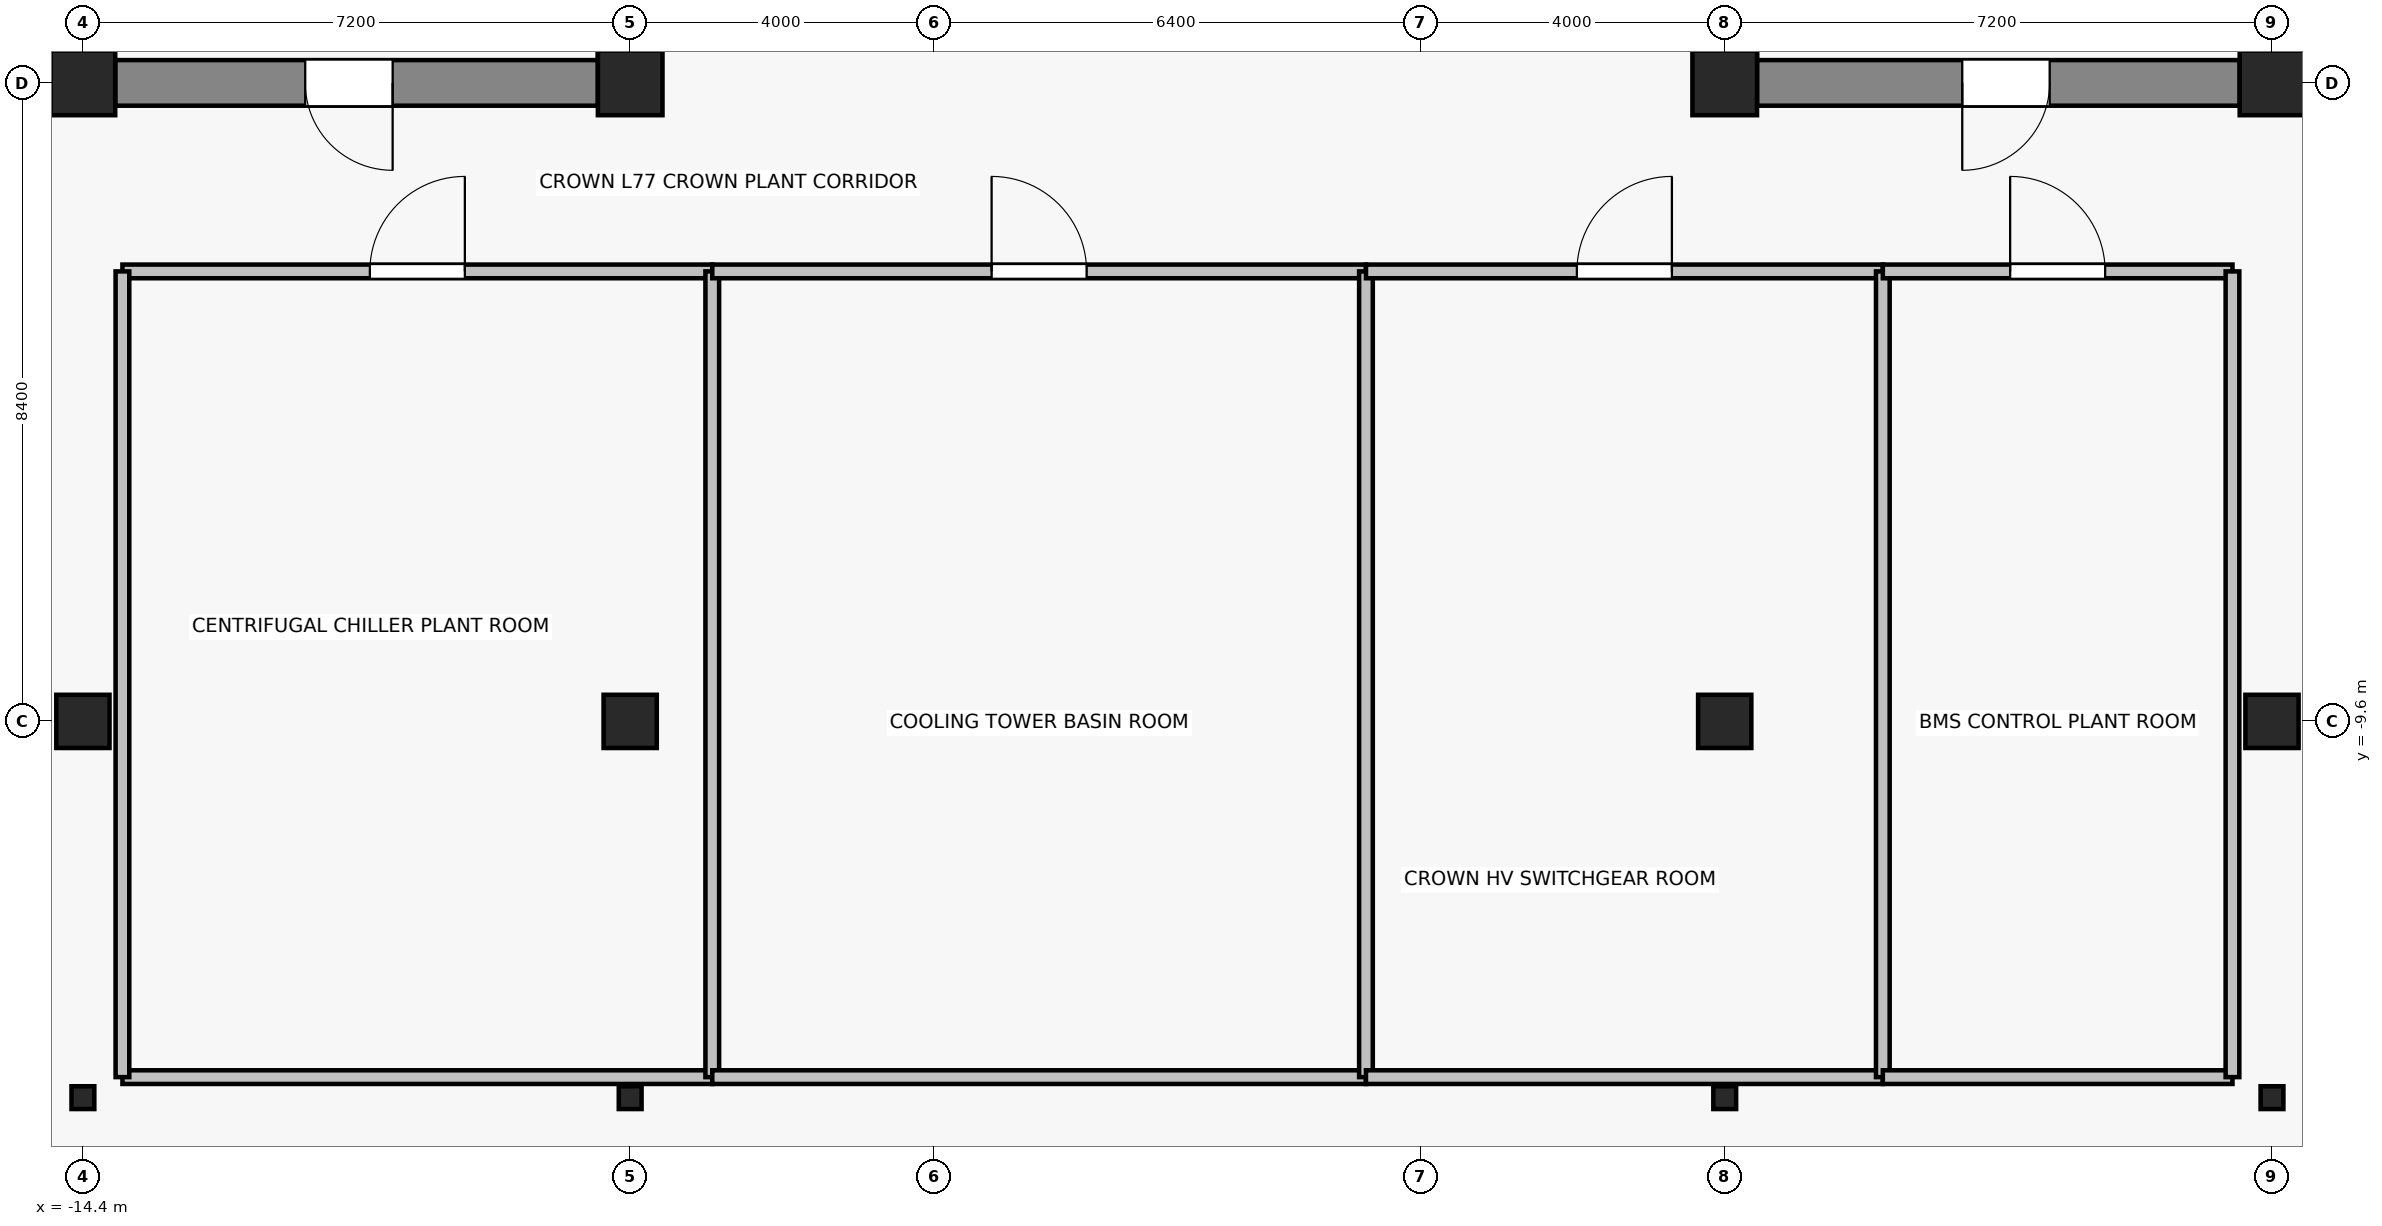
"""IFC4 building model, lengths in metres.
Left out: names, types, materials, properties, quantities, classifications, styles, units other than length and angle.
Written with IfcOpenShell. Run it as: python <this file> out.ifc"""

import sys

from ifc_helpers import new_model, si_unit, direction, frame, frame_2d, origin, origin_2d, place, context, subcontext, project, spatial, rectangle, i_section, extrude, source, transform, mapped, element, fill, save


model = new_model("IFC4")
c1 = context("Model", 3, precision=1e-05, world=origin(), true_north=direction((0.0, 1.0)))
c2 = subcontext(c1, "Body", "Model", "MODEL_VIEW")
j1 = project(units=[si_unit("LENGTHUNIT", "METRE"), si_unit("PLANEANGLEUNIT", "RADIAN")], contexts=[c1])
p1 = place(None, origin())
s1 = spatial("IfcSite", under=j1, at=p1, CompositionType="ELEMENT")
p2 = place(p1, origin())
s2 = spatial("IfcBuilding", under=s1, at=p2, CompositionType="ELEMENT")
p3 = place(p2, frame((0.0, 0.0, 271.6)))
s3 = spatial("IfcBuildingStorey", under=s2, at=p3, CompositionType="ELEMENT", Elevation=271.6)
for number, where, z_axis, x_axis in (
    (1, (-14.4, -1.2, 0.0), (0.0, 0.0, 1.0), (1.0, 0.0, 0.0)),
    (2, (-7.2, -1.2, 0.0), (0.0, 0.0, 1.0), (1.0, 0.0, 0.0)),
    (3, (7.2, -1.2, 0.0), (0.0, 0.0, 1.0), (1.0, 0.0, 0.0)),
    (4, (14.4, -1.2, 0.0), (0.0, 0.0, 1.0), (1.0, 0.0, 0.0)),
):
    element("IfcColumn", number, at=place(p3, frame(where, z_axis=z_axis, x_axis=x_axis)), inside=s3, PredefinedType="COLUMN", context=c2, shape_type="SweptSolid", body=[
        extrude(rectangle(XDim=0.85, YDim=0.85, at=origin_2d()), origin(), (0.0, 0.0, 1.0), 4.6),
    ])
p4 = place(p3, frame((-14.4, -9.6, 0.0), z_axis=(0.0, 0.0, 1.0), x_axis=(1.0, 0.0, 0.0)))
e5 = element("IfcColumn", 5, at=p4, inside=s3, PredefinedType="COLUMN", context=c2, shape_type="SweptSolid", body=[
    extrude(rectangle(XDim=0.7, YDim=0.7, at=origin_2d()), origin(), (0.0, 0.0, 1.0), 4.6),
])
p5 = place(p3, frame((-14.4, -14.55, 0.0), z_axis=(0.0, 0.0, 1.0), x_axis=(1.0, 0.0, 0.0)))
e6 = element("IfcColumn", 6, at=p5, inside=s3, PredefinedType="COLUMN", context=c2, shape_type="SweptSolid", body=[
    extrude(i_section(OverallWidth=0.3, OverallDepth=0.3, WebThickness=0.011, FlangeThickness=0.019, FilletRadius=0.027, at=origin_2d()), origin(), (0.0, 0.0, 1.0), 4.6),
])
p6 = place(p3, frame((-7.2, -9.6, 0.0), z_axis=(0.0, 0.0, 1.0), x_axis=(1.0, 0.0, 0.0)))
e7 = element("IfcColumn", 7, at=p6, inside=s3, PredefinedType="COLUMN", context=c2, shape_type="SweptSolid", body=[
    extrude(rectangle(XDim=0.7, YDim=0.7, at=origin_2d()), origin(), (0.0, 0.0, 1.0), 4.6),
])
p7 = place(p3, frame((-7.2, -14.55, 0.0), z_axis=(0.0, 0.0, 1.0), x_axis=(1.0, 0.0, 0.0)))
e8 = element("IfcColumn", 8, at=p7, inside=s3, PredefinedType="COLUMN", context=c2, shape_type="SweptSolid", body=[
    extrude(i_section(OverallWidth=0.3, OverallDepth=0.3, WebThickness=0.011, FlangeThickness=0.019, FilletRadius=0.027, at=origin_2d()), origin(), (0.0, 0.0, 1.0), 4.6),
])
p8 = place(p3, frame((7.2, -9.6, 0.0), z_axis=(0.0, 0.0, 1.0), x_axis=(1.0, 0.0, 0.0)))
e9 = element("IfcColumn", 9, at=p8, inside=s3, PredefinedType="COLUMN", context=c2, shape_type="SweptSolid", body=[
    extrude(rectangle(XDim=0.7, YDim=0.7, at=origin_2d()), origin(), (0.0, 0.0, 1.0), 4.6),
])
p9 = place(p3, frame((7.2, -14.55, 0.0), z_axis=(0.0, 0.0, 1.0), x_axis=(1.0, 0.0, 0.0)))
e10 = element("IfcColumn", 10, at=p9, inside=s3, PredefinedType="COLUMN", context=c2, shape_type="SweptSolid", body=[
    extrude(i_section(OverallWidth=0.3, OverallDepth=0.3, WebThickness=0.011, FlangeThickness=0.019, FilletRadius=0.027, at=origin_2d()), origin(), (0.0, 0.0, 1.0), 4.6),
])
p10 = place(p3, frame((14.4, -9.6, 0.0), z_axis=(0.0, 0.0, 1.0), x_axis=(1.0, 0.0, 0.0)))
e11 = element("IfcColumn", 11, at=p10, inside=s3, PredefinedType="COLUMN", context=c2, shape_type="SweptSolid", body=[
    extrude(rectangle(XDim=0.7, YDim=0.7, at=origin_2d()), origin(), (0.0, 0.0, 1.0), 4.6),
])
p11 = place(p3, frame((14.4, -14.55, 0.0), z_axis=(0.0, 0.0, 1.0), x_axis=(1.0, 0.0, 0.0)))
e12 = element("IfcColumn", 12, at=p11, inside=s3, PredefinedType="COLUMN", context=c2, shape_type="SweptSolid", body=[
    extrude(i_section(OverallWidth=0.3, OverallDepth=0.3, WebThickness=0.011, FlangeThickness=0.019, FilletRadius=0.027, at=origin_2d()), origin(), (0.0, 0.0, 1.0), 4.6),
])
p12 = place(p3, frame((-7.625, -1.2, 0.0), z_axis=(0.0, 0.0, 1.0), x_axis=(-1.0, 0.0, 0.0)))
e13 = element("IfcWall", 13, at=p12, inside=s3, PredefinedType="SHEAR", context=c2, shape_type="SweptSolid", body=[
    extrude(rectangle(XDim=6.35, YDim=0.6, at=frame_2d((3.175, 0.0))), origin(), (0.0, 0.0, 1.0), 4.38),
])
p13 = place(p12, frame((2.7, 0.0, 0.0)))
e14 = element("IfcOpeningElement", 14, at=p13, cuts=e13, PredefinedType="OPENING", context=c2, shape_type="SweptSolid", body=[
    extrude(rectangle(XDim=1.15, YDim=2.15, at=frame_2d((0.575, 1.075))), frame((0.0, 0.31, 0.0), z_axis=(0.0, -1.0, 0.0), x_axis=(1.0, 0.0, 0.0)), (0.0, 0.0, 1.0), 0.62),
])
p14 = place(p3, frame((13.975, -1.2, 0.0), z_axis=(0.0, 0.0, 1.0), x_axis=(-1.0, 0.0, 0.0)))
e15 = element("IfcWall", 15, at=p14, inside=s3, PredefinedType="SHEAR", context=c2, shape_type="SweptSolid", body=[
    extrude(rectangle(XDim=6.35, YDim=0.6, at=frame_2d((3.175, 0.0))), origin(), (0.0, 0.0, 1.0), 4.38),
])
p15 = place(p14, frame((2.5, 0.0, 0.0)))
e16 = element("IfcOpeningElement", 16, at=p15, cuts=e15, PredefinedType="OPENING", context=c2, shape_type="SweptSolid", body=[
    extrude(rectangle(XDim=1.15, YDim=2.15, at=frame_2d((0.575, 1.075))), frame((0.0, 0.31, 0.0), z_axis=(0.0, -1.0, 0.0), x_axis=(1.0, 0.0, 0.0)), (0.0, 0.0, 1.0), 0.62),
])
for number, where, z_axis, x_axis in (
    (17, (-7.4, -0.9, 0.0), (0.0, 0.0, 1.0), (0.0, 1.0, 0.0)),
    (18, (7.4, -0.9, 0.0), (0.0, 0.0, 1.0), (0.0, 1.0, 0.0)),
):
    element("IfcWall", number, at=place(p3, frame(where, z_axis=z_axis, x_axis=x_axis)), inside=s3, PredefinedType="SHEAR", context=c2, shape_type="SweptSolid", body=[
        extrude(rectangle(XDim=4.15, YDim=0.45, at=frame_2d((2.075, 0.0))), origin(), (0.0, 0.0, 1.0), 4.38),
    ])
p16 = place(p3, frame((-6.12, -14.28, 0.0), z_axis=(0.0, 0.0, 1.0), x_axis=(-1.0, 0.0, 0.0)))
e19 = element("IfcWall", 19, at=p16, inside=s3, PredefinedType="PARTITIONING", context=c2, shape_type="SweptSolid", body=[
    extrude(rectangle(XDim=7.76, YDim=0.18, at=frame_2d((3.88, 0.0))), origin(), (0.0, 0.0, 1.0), 3.77),
])
p17 = place(p3, frame((-13.88, -3.68, 0.0), z_axis=(0.0, 0.0, 1.0), x_axis=(1.0, 0.0, 0.0)))
e20 = element("IfcWall", 20, at=p17, inside=s3, PredefinedType="PARTITIONING", context=c2, shape_type="SweptSolid", body=[
    extrude(rectangle(XDim=7.76, YDim=0.18, at=frame_2d((3.88, 0.0))), origin(), (0.0, 0.0, 1.0), 3.77),
])
p18 = place(p17, frame((3.255, 0.0, 0.0)))
e21 = element("IfcOpeningElement", 21, at=p18, cuts=e20, PredefinedType="OPENING", context=c2, shape_type="SweptSolid", body=[
    extrude(rectangle(XDim=1.25, YDim=2.15, at=frame_2d((0.625, 1.075))), frame((0.0, 0.1, 0.0), z_axis=(0.0, -1.0, 0.0), x_axis=(1.0, 0.0, 0.0)), (0.0, 0.0, 1.0), 0.2),
])
for number, where, z_axis, x_axis in (
    (22, (-13.88, -14.28, 0.0), (0.0, 0.0, 1.0), (0.0, 1.0, 0.0)),
    (23, (-6.12, -3.68, 0.0), (0.0, 0.0, 1.0), (0.0, -1.0, 0.0)),
):
    element("IfcWall", number, at=place(p3, frame(where, z_axis=z_axis, x_axis=x_axis)), inside=s3, PredefinedType="PARTITIONING", context=c2, shape_type="SweptSolid", body=[
        extrude(rectangle(XDim=10.6, YDim=0.18, at=frame_2d((5.3, 0.0))), origin(), (0.0, 0.0, 1.0), 3.77),
    ])
p19 = place(p3, frame((2.48, -14.28, 0.0), z_axis=(0.0, 0.0, 1.0), x_axis=(-1.0, 0.0, 0.0)))
e24 = element("IfcWall", 24, at=p19, inside=s3, PredefinedType="PARTITIONING", context=c2, shape_type="SweptSolid", body=[
    extrude(rectangle(XDim=8.6, YDim=0.18, at=frame_2d((4.3, 0.0))), origin(), (0.0, 0.0, 1.0), 4.09),
])
p20 = place(p3, frame((-6.12, -3.68, 0.0), z_axis=(0.0, 0.0, 1.0), x_axis=(1.0, 0.0, 0.0)))
e25 = element("IfcWall", 25, at=p20, inside=s3, PredefinedType="PARTITIONING", context=c2, shape_type="SweptSolid", body=[
    extrude(rectangle(XDim=8.6, YDim=0.18, at=frame_2d((4.3, 0.0))), origin(), (0.0, 0.0, 1.0), 4.38),
])
p21 = place(p20, frame((3.675, 0.0, 0.0)))
e26 = element("IfcOpeningElement", 26, at=p21, cuts=e25, PredefinedType="OPENING", context=c2, shape_type="SweptSolid", body=[
    extrude(rectangle(XDim=1.25, YDim=2.15, at=frame_2d((0.625, 1.075))), frame((0.0, 0.1, 0.0), z_axis=(0.0, -1.0, 0.0), x_axis=(1.0, 0.0, 0.0)), (0.0, 0.0, 1.0), 0.2),
])
p22 = place(p3, frame((2.48, -3.68, 0.0), z_axis=(0.0, 0.0, 1.0), x_axis=(0.0, -1.0, 0.0)))
e27 = element("IfcWall", 27, at=p22, inside=s3, PredefinedType="PARTITIONING", context=c2, shape_type="SweptSolid", body=[
    extrude(rectangle(XDim=10.6, YDim=0.18, at=frame_2d((5.3, 0.0))), origin(), (0.0, 0.0, 1.0), 3.77),
])
p23 = place(p3, frame((9.28, -14.28, 0.0), z_axis=(0.0, 0.0, 1.0), x_axis=(-1.0, 0.0, 0.0)))
e28 = element("IfcWall", 28, at=p23, inside=s3, PredefinedType="PARTITIONING", context=c2, shape_type="SweptSolid", body=[
    extrude(rectangle(XDim=6.8, YDim=0.18, at=frame_2d((3.4, 0.0))), origin(), (0.0, 0.0, 1.0), 3.77),
])
p24 = place(p3, frame((2.48, -3.68, 0.0), z_axis=(0.0, 0.0, 1.0), x_axis=(1.0, 0.0, 0.0)))
e29 = element("IfcWall", 29, at=p24, inside=s3, PredefinedType="PARTITIONING", context=c2, shape_type="SweptSolid", body=[
    extrude(rectangle(XDim=6.8, YDim=0.18, at=frame_2d((3.4, 0.0))), origin(), (0.0, 0.0, 1.0), 3.77),
])
p25 = place(p24, frame((2.775, 0.0, 0.0)))
e30 = element("IfcOpeningElement", 30, at=p25, cuts=e29, PredefinedType="OPENING", context=c2, shape_type="SweptSolid", body=[
    extrude(rectangle(XDim=1.25, YDim=2.15, at=frame_2d((0.625, 1.075))), frame((0.0, 0.1, 0.0), z_axis=(0.0, -1.0, 0.0), x_axis=(1.0, 0.0, 0.0)), (0.0, 0.0, 1.0), 0.2),
])
p26 = place(p3, frame((9.28, -3.68, 0.0), z_axis=(0.0, 0.0, 1.0), x_axis=(0.0, -1.0, 0.0)))
e31 = element("IfcWall", 31, at=p26, inside=s3, PredefinedType="PARTITIONING", context=c2, shape_type="SweptSolid", body=[
    extrude(rectangle(XDim=10.6, YDim=0.18, at=frame_2d((5.3, 0.0))), origin(), (0.0, 0.0, 1.0), 3.77),
])
p27 = place(p3, frame((13.88, -14.28, 0.0), z_axis=(0.0, 0.0, 1.0), x_axis=(-1.0, 0.0, 0.0)))
e32 = element("IfcWall", 32, at=p27, inside=s3, PredefinedType="PARTITIONING", context=c2, shape_type="SweptSolid", body=[
    extrude(rectangle(XDim=4.6, YDim=0.18, at=frame_2d((2.3, 0.0))), origin(), (0.0, 0.0, 1.0), 4.09),
])
p28 = place(p3, frame((9.28, -3.68, 0.0), z_axis=(0.0, 0.0, 1.0), x_axis=(1.0, 0.0, 0.0)))
e33 = element("IfcWall", 33, at=p28, inside=s3, PredefinedType="PARTITIONING", context=c2, shape_type="SweptSolid", body=[
    extrude(rectangle(XDim=4.6, YDim=0.18, at=frame_2d((2.3, 0.0))), origin(), (0.0, 0.0, 1.0), 4.38),
])
p29 = place(p28, frame((1.675, 0.0, 0.0)))
e34 = element("IfcOpeningElement", 34, at=p29, cuts=e33, PredefinedType="OPENING", context=c2, shape_type="SweptSolid", body=[
    extrude(rectangle(XDim=1.25, YDim=2.15, at=frame_2d((0.625, 1.075))), frame((0.0, 0.1, 0.0), z_axis=(0.0, -1.0, 0.0), x_axis=(1.0, 0.0, 0.0)), (0.0, 0.0, 1.0), 0.2),
])
p30 = place(p3, frame((13.88, -3.68, 0.0), z_axis=(0.0, 0.0, 1.0), x_axis=(0.0, -1.0, 0.0)))
e35 = element("IfcWall", 35, at=p30, inside=s3, PredefinedType="PARTITIONING", context=c2, shape_type="SweptSolid", body=[
    extrude(rectangle(XDim=10.6, YDim=0.18, at=frame_2d((5.3, 0.0))), origin(), (0.0, 0.0, 1.0), 3.77),
])
m1 = source(origin(), c2, "Body", "SweptSolid", [
    extrude(rectangle(XDim=1.15, YDim=2.15, at=frame_2d((0.575, 1.075))), frame((0.0, 0.025, 0.0), z_axis=(0.0, -1.0, 0.0), x_axis=(1.0, 0.0, 0.0)), (0.0, 0.0, 1.0), 0.05),
])
p31 = place(p13, origin())
e36 = element("IfcDoor", 36, at=p31, inside=s3, OperationType="SINGLE_SWING_LEFT", PredefinedType="DOOR", context=c2, shape_type="MappedRepresentation", body=[
    mapped(m1, transform((0.0, 0.0, 0.0), x_axis=(1.0, 0.0, 0.0), y_axis=(0.0, 1.0, 0.0), z_axis=(0.0, 0.0, 1.0), scale=1.0)),
])
fill(e14, e36)
p32 = place(p15, origin())
e37 = element("IfcDoor", 37, at=p32, inside=s3, OperationType="SINGLE_SWING_RIGHT", PredefinedType="DOOR", context=c2, shape_type="MappedRepresentation", body=[
    mapped(m1, transform((0.0, 0.0, 0.0), x_axis=(1.0, 0.0, 0.0), y_axis=(0.0, 1.0, 0.0), z_axis=(0.0, 0.0, 1.0), scale=1.0)),
])
fill(e16, e37)
m2 = source(origin(), c2, "Body", "SweptSolid", [
    extrude(rectangle(XDim=1.25, YDim=2.15, at=frame_2d((0.625, 1.075))), frame((0.0, 0.025, 0.0), z_axis=(0.0, -1.0, 0.0), x_axis=(1.0, 0.0, 0.0)), (0.0, 0.0, 1.0), 0.05),
])
p33 = place(p18, origin())
e38 = element("IfcDoor", 38, at=p33, inside=s3, OperationType="SINGLE_SWING_RIGHT", PredefinedType="DOOR", context=c2, shape_type="MappedRepresentation", body=[
    mapped(m2, transform((0.0, 0.0, 0.0), x_axis=(1.0, 0.0, 0.0), y_axis=(0.0, 1.0, 0.0), z_axis=(0.0, 0.0, 1.0), scale=1.0)),
])
fill(e21, e38)
p34 = place(p21, origin())
e39 = element("IfcDoor", 39, at=p34, inside=s3, OperationType="SINGLE_SWING_LEFT", PredefinedType="DOOR", context=c2, shape_type="MappedRepresentation", body=[
    mapped(m2, transform((0.0, 0.0, 0.0), x_axis=(1.0, 0.0, 0.0), y_axis=(0.0, 1.0, 0.0), z_axis=(0.0, 0.0, 1.0), scale=1.0)),
])
fill(e26, e39)
p35 = place(p25, origin())
e40 = element("IfcDoor", 40, at=p35, inside=s3, OperationType="SINGLE_SWING_RIGHT", PredefinedType="DOOR", context=c2, shape_type="MappedRepresentation", body=[
    mapped(m2, transform((0.0, 0.0, 0.0), x_axis=(1.0, 0.0, 0.0), y_axis=(0.0, 1.0, 0.0), z_axis=(0.0, 0.0, 1.0), scale=1.0)),
])
fill(e30, e40)
p36 = place(p29, origin())
e41 = element("IfcDoor", 41, at=p36, inside=s3, OperationType="SINGLE_SWING_LEFT", PredefinedType="DOOR", context=c2, shape_type="MappedRepresentation", body=[
    mapped(m2, transform((0.0, 0.0, 0.0), x_axis=(1.0, 0.0, 0.0), y_axis=(0.0, 1.0, 0.0), z_axis=(0.0, 0.0, 1.0), scale=1.0)),
])
fill(e34, e41)
save(model, sys.argv[1])
